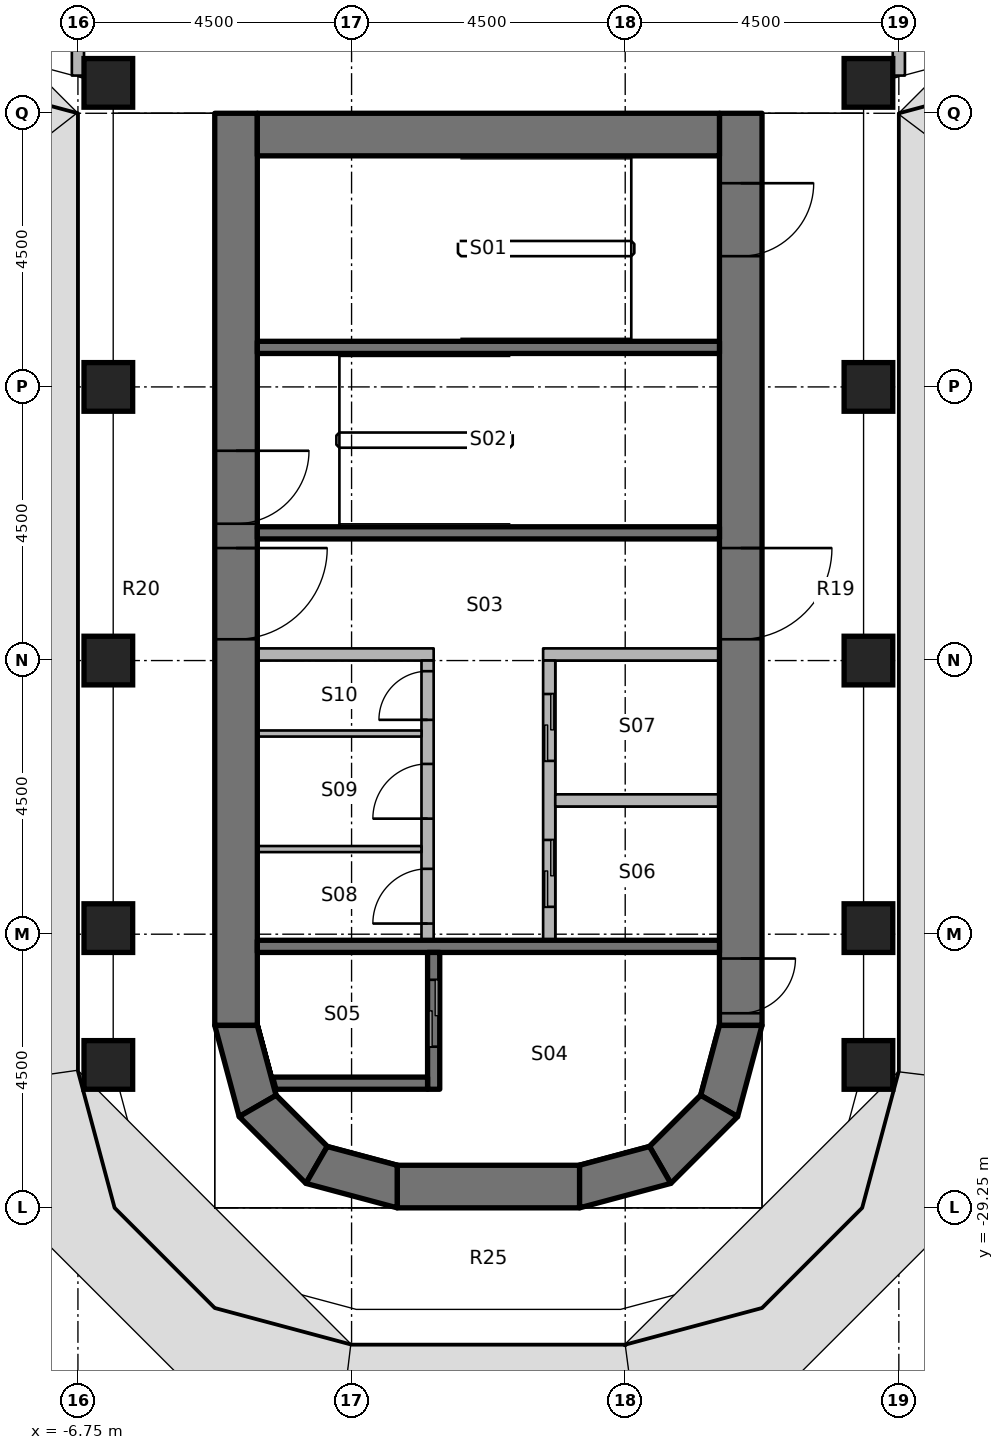
"""IFC4 building model, lengths in metres.
Left out: names, types, materials, properties, quantities, classifications, styles, units other than length and angle.
Written with IfcOpenShell. Run it as: python <this file> out.ifc"""

import sys

from ifc_helpers import new_model, si_unit, direction, frame, frame_2d, origin, origin_2d, place, context, subcontext, project, spatial, polyline, rectangle, outline, extrude, element, fill, save


model = new_model("IFC4")
c1 = context("Model", 3, precision=1e-05, world=origin(), true_north=direction((0.0, 1.0)))
c2 = subcontext(c1, "Body", "Model", "MODEL_VIEW")
j1 = project(units=[si_unit("LENGTHUNIT", "METRE"), si_unit("PLANEANGLEUNIT", "RADIAN")], contexts=[c1])
p1 = place(None, origin())
s1 = spatial("IfcSite", under=j1, at=p1, CompositionType="ELEMENT")
p2 = place(p1, origin())
s2 = spatial("IfcBuilding", under=s1, at=p2, CompositionType="ELEMENT")
p3 = place(p2, frame((0.0, 0.0, 171.4)))
s3 = spatial("IfcBuildingStorey", under=s2, at=p3, CompositionType="ELEMENT", Elevation=171.4)
for number, where, z_axis, x_axis in (
    (1, (-6.25, -26.9, 0.0), (0.0, 0.0, 1.0), (1.0, 0.0, 0.0)),
    (2, (-6.25, -24.65, 0.0), (0.0, 0.0, 1.0), (1.0, 0.0, 0.0)),
    (3, (-6.25, -20.25, 0.0), (0.0, 0.0, 1.0), (1.0, 0.0, 0.0)),
    (4, (-6.25, -15.75, 0.0), (0.0, 0.0, 1.0), (1.0, 0.0, 0.0)),
    (5, (-6.25, -10.75, 0.0), (0.0, 0.0, 1.0), (1.0, 0.0, 0.0)),
    (6, (6.25, -26.9, 0.0), (0.0, 0.0, 1.0), (1.0, 0.0, 0.0)),
    (7, (6.25, -24.65, 0.0), (0.0, 0.0, 1.0), (1.0, 0.0, 0.0)),
    (8, (6.25, -20.25, 0.0), (0.0, 0.0, 1.0), (1.0, 0.0, 0.0)),
    (9, (6.25, -15.75, 0.0), (0.0, 0.0, 1.0), (1.0, 0.0, 0.0)),
    (10, (6.25, -10.75, 0.0), (0.0, 0.0, 1.0), (1.0, 0.0, 0.0)),
):
    element("IfcColumn", number, at=place(p3, frame(where, z_axis=z_axis, x_axis=x_axis)), inside=s3, PredefinedType="COLUMN", context=c2, shape_type="SweptSolid", body=[
        extrude(rectangle(XDim=0.8, YDim=0.8, at=origin_2d()), origin(), (0.0, 0.0, 1.0), 3.65),
    ])
p4 = place(p3, frame((-4.15, -11.25, 0.0), z_axis=(0.0, 0.0, 1.0), x_axis=(0.0, -1.0, 0.0)))
e11 = element("IfcWall", 11, at=p4, inside=s3, PredefinedType="SHEAR", context=c2, shape_type="SweptSolid", body=[
    extrude(rectangle(XDim=15.0, YDim=0.7, at=frame_2d((7.5, 0.0))), origin(), (0.0, 0.0, 1.0), 3.8),
])
p5 = place(p4, frame((7.15, 0.0, 0.0)))
e12 = element("IfcOpeningElement", 12, at=p5, cuts=e11, PredefinedType="OPENING", context=c2, shape_type="SweptSolid", body=[
    extrude(rectangle(XDim=1.5, YDim=2.3, at=frame_2d((0.75, 1.15))), frame((0.0, 0.36, 0.0), z_axis=(0.0, -1.0, 0.0), x_axis=(1.0, 0.0, 0.0)), (0.0, 0.0, 1.0), 0.72),
])
p6 = place(p4, frame((5.55, 0.0, 0.0)))
e13 = element("IfcOpeningElement", 13, at=p6, cuts=e11, PredefinedType="OPENING", context=c2, shape_type="SweptSolid", body=[
    extrude(rectangle(XDim=1.2, YDim=2.1, at=frame_2d((0.6, 1.05))), frame((0.0, 0.36, 0.0), z_axis=(0.0, -1.0, 0.0), x_axis=(1.0, 0.0, 0.0)), (0.0, 0.0, 1.0), 0.72),
])
p7 = place(p3, frame((4.15, -11.25, 0.0), z_axis=(0.0, 0.0, 1.0), x_axis=(0.0, -1.0, 0.0)))
e14 = element("IfcWall", 14, at=p7, inside=s3, PredefinedType="SHEAR", context=c2, shape_type="SweptSolid", body=[
    extrude(rectangle(XDim=15.0, YDim=0.7, at=frame_2d((7.5, 0.0))), origin(), (0.0, 0.0, 1.0), 3.8),
])
p8 = place(p7, frame((7.15, 0.0, 0.0)))
e15 = element("IfcOpeningElement", 15, at=p8, cuts=e14, PredefinedType="OPENING", context=c2, shape_type="SweptSolid", body=[
    extrude(rectangle(XDim=1.5, YDim=2.3, at=frame_2d((0.75, 1.15))), frame((0.0, 0.36, 0.0), z_axis=(0.0, -1.0, 0.0), x_axis=(1.0, 0.0, 0.0)), (0.0, 0.0, 1.0), 0.72),
])
p9 = place(p7, frame((13.9, 0.0, 0.0)))
e16 = element("IfcOpeningElement", 16, at=p9, cuts=e14, PredefinedType="OPENING", context=c2, shape_type="SweptSolid", body=[
    extrude(rectangle(XDim=0.9, YDim=2.1, at=frame_2d((0.45, 1.05))), frame((0.0, 0.36, 0.0), z_axis=(0.0, -1.0, 0.0), x_axis=(1.0, 0.0, 0.0)), (0.0, 0.0, 1.0), 0.72),
])
p10 = place(p7, frame((1.15, 0.0, 0.0)))
e17 = element("IfcOpeningElement", 17, at=p10, cuts=e14, PredefinedType="OPENING", context=c2, shape_type="SweptSolid", body=[
    extrude(rectangle(XDim=1.2, YDim=2.1, at=frame_2d((0.6, 1.05))), frame((0.0, 0.36, 0.0), z_axis=(0.0, -1.0, 0.0), x_axis=(1.0, 0.0, 0.0)), (0.0, 0.0, 1.0), 0.72),
])
p11 = place(p3, frame((-3.8, -11.6, 0.0), z_axis=(0.0, 0.0, 1.0), x_axis=(1.0, 0.0, 0.0)))
e18 = element("IfcWall", 18, at=p11, inside=s3, PredefinedType="SHEAR", context=c2, shape_type="SweptSolid", body=[
    extrude(rectangle(XDim=7.6, YDim=0.7, at=frame_2d((3.8, 0.0))), origin(), (0.0, 0.0, 1.0), 3.8),
])
p12 = place(p3, frame((-1.5, -28.9, 0.0), z_axis=(0.0, 0.0, 1.0), x_axis=(1.0, 0.0, 0.0)))
e19 = element("IfcWall", 19, at=p12, inside=s3, PredefinedType="SHEAR", context=c2, shape_type="SweptSolid", body=[
    extrude(rectangle(XDim=3.0, YDim=0.7, at=frame_2d((1.5, 0.0))), origin(), (0.0, 0.0, 1.0), 3.8),
])
p13 = place(p3, origin())
e20 = element("IfcWall", 20, at=p13, inside=s3, PredefinedType="SHEAR", context=c2, shape_type="SweptSolid", body=[
    extrude(outline(polyline([(-4.5, -26.25), (-4.098, -27.75), (-3.492, -27.4), (-3.8, -26.25), (-4.5, -26.25)])), origin(), (0.0, 0.0, 1.0), 3.8),
])
p14 = place(p3, origin())
e21 = element("IfcWall", 21, at=p14, inside=s3, PredefinedType="SHEAR", context=c2, shape_type="SweptSolid", body=[
    extrude(outline(polyline([(-4.098, -27.75), (-3.0, -28.848), (-2.65, -28.242), (-3.492, -27.4), (-4.098, -27.75)])), origin(), (0.0, 0.0, 1.0), 3.8),
])
p15 = place(p3, origin())
e22 = element("IfcWall", 22, at=p15, inside=s3, PredefinedType="SHEAR", context=c2, shape_type="SweptSolid", body=[
    extrude(outline(polyline([(-3.0, -28.848), (-1.5, -29.25), (-1.5, -28.55), (-2.65, -28.242), (-3.0, -28.848)])), origin(), (0.0, 0.0, 1.0), 3.8),
])
p16 = place(p3, origin())
e23 = element("IfcWall", 23, at=p16, inside=s3, PredefinedType="SHEAR", context=c2, shape_type="SweptSolid", body=[
    extrude(outline(polyline([(4.5, -26.25), (4.098, -27.75), (3.492, -27.4), (3.8, -26.25), (4.5, -26.25)])), origin(), (0.0, 0.0, 1.0), 3.8),
])
p17 = place(p3, origin())
e24 = element("IfcWall", 24, at=p17, inside=s3, PredefinedType="SHEAR", context=c2, shape_type="SweptSolid", body=[
    extrude(outline(polyline([(4.098, -27.75), (3.0, -28.848), (2.65, -28.242), (3.492, -27.4), (4.098, -27.75)])), origin(), (0.0, 0.0, 1.0), 3.8),
])
p18 = place(p3, origin())
e25 = element("IfcWall", 25, at=p18, inside=s3, PredefinedType="SHEAR", context=c2, shape_type="SweptSolid", body=[
    extrude(outline(polyline([(3.0, -28.848), (1.5, -29.25), (1.5, -28.55), (2.65, -28.242), (3.0, -28.848)])), origin(), (0.0, 0.0, 1.0), 3.8),
])
p19 = place(p3, frame((3.8, -24.95, 0.0), z_axis=(0.0, 0.0, 1.0), x_axis=(-1.0, 0.0, 0.0)))
e26 = element("IfcWall", 26, at=p19, inside=s3, PredefinedType="SHEAR", context=c2, shape_type="SweptSolid", body=[
    extrude(rectangle(XDim=7.6, YDim=0.2, at=frame_2d((3.8, 0.0))), origin(), (0.0, 0.0, 1.0), 3.65),
])
p20 = place(p3, frame((-0.9, -27.3, 0.0), z_axis=(0.0, 0.0, 1.0), x_axis=(0.0, 1.0, 0.0)))
e27 = element("IfcWall", 27, at=p20, inside=s3, PredefinedType="SHEAR", context=c2, shape_type="SweptSolid", body=[
    extrude(rectangle(XDim=2.25, YDim=0.2, at=frame_2d((1.125, 0.0))), origin(), (0.0, 0.0, 1.0), 3.65),
])
p21 = place(p20, frame((0.7, 0.0, 0.0)))
e28 = element("IfcOpeningElement", 28, at=p21, cuts=e27, PredefinedType="OPENING", context=c2, shape_type="SweptSolid", body=[
    extrude(rectangle(XDim=1.1, YDim=2.3, at=frame_2d((0.55, 1.15))), frame((0.0, 0.11, 0.0), z_axis=(0.0, -1.0, 0.0), x_axis=(1.0, 0.0, 0.0)), (0.0, 0.0, 1.0), 0.22),
])
p22 = place(p3, origin())
e29 = element("IfcWall", 29, at=p22, inside=s3, PredefinedType="SHEAR", context=c2, shape_type="SweptSolid", body=[
    extrude(outline(polyline([(-1.0, -27.1), (-3.548, -27.1), (-3.494, -27.3), (-1.0, -27.3), (-1.0, -27.1)])), origin(), (0.0, 0.0, 1.0), 3.65),
])
for number, where, z_axis, x_axis in (
    (30, (3.8, -18.15, 0.0), (0.0, 0.0, 1.0), (-1.0, 0.0, 0.0)),
    (31, (3.8, -15.1, 0.0), (0.0, 0.0, 1.0), (-1.0, 0.0, 0.0)),
):
    element("IfcWall", number, at=place(p3, frame(where, z_axis=z_axis, x_axis=x_axis)), inside=s3, PredefinedType="SHEAR", context=c2, shape_type="SweptSolid", body=[
        extrude(rectangle(XDim=7.6, YDim=0.2, at=frame_2d((3.8, 0.0))), origin(), (0.0, 0.0, 1.0), 3.65),
    ])
p23 = place(p3, frame((3.8, -20.15, 0.0), z_axis=(0.0, 0.0, 1.0), x_axis=(-1.0, 0.0, 0.0)))
e32 = element("IfcWall", 32, at=p23, inside=s3, PredefinedType="PARTITIONING", context=c2, shape_type="SweptSolid", body=[
    extrude(rectangle(XDim=2.9, YDim=0.2, at=frame_2d((1.45, 0.0))), origin(), (0.0, 0.0, 1.0), 3.65),
])
p24 = place(p3, frame((1.0, -24.85, 0.0), z_axis=(0.0, 0.0, 1.0), x_axis=(0.0, 1.0, 0.0)))
e33 = element("IfcWall", 33, at=p24, inside=s3, PredefinedType="PARTITIONING", context=c2, shape_type="SweptSolid", body=[
    extrude(rectangle(XDim=4.6, YDim=0.2, at=frame_2d((2.3, 0.0))), origin(), (0.0, 0.0, 1.0), 3.65),
])
p25 = place(p24, frame((0.55, 0.0, 0.0)))
e34 = element("IfcOpeningElement", 34, at=p25, cuts=e33, PredefinedType="OPENING", context=c2, shape_type="SweptSolid", body=[
    extrude(rectangle(XDim=1.1, YDim=2.3, at=frame_2d((0.55, 1.15))), frame((0.0, 0.11, 0.0), z_axis=(0.0, -1.0, 0.0), x_axis=(1.0, 0.0, 0.0)), (0.0, 0.0, 1.0), 0.22),
])
p26 = place(p24, frame((2.95, 0.0, 0.0)))
e35 = element("IfcOpeningElement", 35, at=p26, cuts=e33, PredefinedType="OPENING", context=c2, shape_type="SweptSolid", body=[
    extrude(rectangle(XDim=1.1, YDim=2.3, at=frame_2d((0.55, 1.15))), frame((0.0, 0.11, 0.0), z_axis=(0.0, -1.0, 0.0), x_axis=(1.0, 0.0, 0.0)), (0.0, 0.0, 1.0), 0.22),
])
p27 = place(p3, frame((-0.9, -20.15, 0.0), z_axis=(0.0, 0.0, 1.0), x_axis=(-1.0, 0.0, 0.0)))
e36 = element("IfcWall", 36, at=p27, inside=s3, PredefinedType="PARTITIONING", context=c2, shape_type="SweptSolid", body=[
    extrude(rectangle(XDim=2.9, YDim=0.2, at=frame_2d((1.45, 0.0))), origin(), (0.0, 0.0, 1.0), 3.65),
])
p28 = place(p3, frame((-1.0, -24.85, 0.0), z_axis=(0.0, 0.0, 1.0), x_axis=(0.0, 1.0, 0.0)))
e37 = element("IfcWall", 37, at=p28, inside=s3, PredefinedType="PARTITIONING", context=c2, shape_type="SweptSolid", body=[
    extrude(rectangle(XDim=4.6, YDim=0.2, at=frame_2d((2.3, 0.0))), origin(), (0.0, 0.0, 1.0), 3.65),
])
p29 = place(p28, frame((0.275, 0.0, 0.0)))
e38 = element("IfcOpeningElement", 38, at=p29, cuts=e37, PredefinedType="OPENING", context=c2, shape_type="SweptSolid", body=[
    extrude(rectangle(XDim=0.9, YDim=2.1, at=frame_2d((0.45, 1.05))), frame((0.0, 0.11, 0.0), z_axis=(0.0, -1.0, 0.0), x_axis=(1.0, 0.0, 0.0)), (0.0, 0.0, 1.0), 0.22),
])
p30 = place(p28, frame((2.0, 0.0, 0.0)))
e39 = element("IfcOpeningElement", 39, at=p30, cuts=e37, PredefinedType="OPENING", context=c2, shape_type="SweptSolid", body=[
    extrude(rectangle(XDim=0.9, YDim=2.1, at=frame_2d((0.45, 1.05))), frame((0.0, 0.11, 0.0), z_axis=(0.0, -1.0, 0.0), x_axis=(1.0, 0.0, 0.0)), (0.0, 0.0, 1.0), 0.22),
])
p31 = place(p28, frame((3.625, 0.0, 0.0)))
e40 = element("IfcOpeningElement", 40, at=p31, cuts=e37, PredefinedType="OPENING", context=c2, shape_type="SweptSolid", body=[
    extrude(rectangle(XDim=0.8, YDim=2.1, at=frame_2d((0.4, 1.05))), frame((0.0, 0.11, 0.0), z_axis=(0.0, -1.0, 0.0), x_axis=(1.0, 0.0, 0.0)), (0.0, 0.0, 1.0), 0.22),
])
p32 = place(p3, frame((3.8, -22.55, 0.0), z_axis=(0.0, 0.0, 1.0), x_axis=(-1.0, 0.0, 0.0)))
e41 = element("IfcWall", 41, at=p32, inside=s3, PredefinedType="PARTITIONING", context=c2, shape_type="SweptSolid", body=[
    extrude(rectangle(XDim=2.7, YDim=0.2, at=frame_2d((1.35, 0.0))), origin(), (0.0, 0.0, 1.0), 3.65),
])
for number, where, z_axis, x_axis in (
    (42, (-1.1, -23.35, 0.0), (0.0, 0.0, 1.0), (-1.0, 0.0, 0.0)),
    (43, (-1.1, -21.45, 0.0), (0.0, 0.0, 1.0), (-1.0, 0.0, 0.0)),
):
    element("IfcWall", number, at=place(p3, frame(where, z_axis=z_axis, x_axis=x_axis)), inside=s3, PredefinedType="PARTITIONING", context=c2, shape_type="SweptSolid", body=[
        extrude(rectangle(XDim=2.7, YDim=0.1, at=frame_2d((1.35, 0.0))), origin(), (0.0, 0.0, 1.0), 3.65),
    ])
p33 = place(p3, frame((6.75, -6.85, 0.0), z_axis=(0.0, 0.0, 1.0), x_axis=(0.0, -1.0, 0.0)))
e44 = element("IfcWall", 44, at=p33, inside=s3, PredefinedType="PARTITIONING", context=c2, shape_type="SweptSolid", body=[
    extrude(rectangle(XDim=3.78, YDim=0.2, at=frame_2d((1.89, 0.0))), origin(), (0.0, 0.0, 1.0), 2.75),
])
p34 = place(p33, frame((1.44, 0.0, 0.0)))
e45 = element("IfcOpeningElement", 45, at=p34, cuts=e44, PredefinedType="OPENING", context=c2, shape_type="SweptSolid", body=[
    extrude(rectangle(XDim=0.9, YDim=2.1, at=frame_2d((0.45, 1.05))), frame((0.0, 0.11, 0.0), z_axis=(0.0, -1.0, 0.0), x_axis=(1.0, 0.0, 0.0)), (0.0, 0.0, 1.0), 0.22),
])
p35 = place(p3, frame((-6.75, -10.63, 0.0), z_axis=(0.0, 0.0, 1.0), x_axis=(0.0, 1.0, 0.0)))
e46 = element("IfcWall", 46, at=p35, inside=s3, PredefinedType="PARTITIONING", context=c2, shape_type="SweptSolid", body=[
    extrude(rectangle(XDim=3.78, YDim=0.2, at=frame_2d((1.89, 0.0))), origin(), (0.0, 0.0, 1.0), 2.75),
])
p36 = place(p8, origin())
e47 = element("IfcDoor", 47, at=p36, inside=s3, OperationType="DOUBLE_DOOR_SINGLE_SWING", PredefinedType="DOOR", context=c2, shape_type="SweptSolid", body=[
    extrude(rectangle(XDim=1.5, YDim=2.3, at=frame_2d((0.75, 1.15))), frame((0.0, 0.025, 0.0), z_axis=(0.0, -1.0, 0.0), x_axis=(1.0, 0.0, 0.0)), (0.0, 0.0, 1.0), 0.05),
])
fill(e15, e47)
p37 = place(p5, origin())
e48 = element("IfcDoor", 48, at=p37, inside=s3, OperationType="DOUBLE_DOOR_SINGLE_SWING", PredefinedType="DOOR", context=c2, shape_type="SweptSolid", body=[
    extrude(rectangle(XDim=1.5, YDim=2.3, at=frame_2d((0.75, 1.15))), frame((0.0, 0.025, 0.0), z_axis=(0.0, -1.0, 0.0), x_axis=(1.0, 0.0, 0.0)), (0.0, 0.0, 1.0), 0.05),
])
fill(e12, e48)
p38 = place(p9, origin())
e49 = element("IfcDoor", 49, at=p38, inside=s3, OperationType="SINGLE_SWING_RIGHT", PredefinedType="DOOR", context=c2, shape_type="SweptSolid", body=[
    extrude(rectangle(XDim=0.9, YDim=2.1, at=frame_2d((0.45, 1.05))), frame((0.0, 0.025, 0.0), z_axis=(0.0, -1.0, 0.0), x_axis=(1.0, 0.0, 0.0)), (0.0, 0.0, 1.0), 0.05),
])
fill(e16, e49)
p39 = place(p6, origin())
e50 = element("IfcDoor", 50, at=p39, inside=s3, OperationType="SINGLE_SWING_RIGHT", PredefinedType="DOOR", context=c2, shape_type="SweptSolid", body=[
    extrude(rectangle(XDim=1.2, YDim=2.1, at=frame_2d((0.6, 1.05))), frame((0.0, 0.025, 0.0), z_axis=(0.0, -1.0, 0.0), x_axis=(1.0, 0.0, 0.0)), (0.0, 0.0, 1.0), 0.05),
])
fill(e13, e50)
p40 = place(p10, origin())
e51 = element("IfcDoor", 51, at=p40, inside=s3, OperationType="SINGLE_SWING_RIGHT", PredefinedType="DOOR", context=c2, shape_type="SweptSolid", body=[
    extrude(rectangle(XDim=1.2, YDim=2.1, at=frame_2d((0.6, 1.05))), frame((0.0, 0.025, 0.0), z_axis=(0.0, -1.0, 0.0), x_axis=(1.0, 0.0, 0.0)), (0.0, 0.0, 1.0), 0.05),
])
fill(e17, e51)
p41 = place(p21, origin())
e52 = element("IfcDoor", 52, at=p41, inside=s3, OperationType="DOUBLE_DOOR_SLIDING", PredefinedType="DOOR", context=c2, shape_type="SweptSolid", body=[
    extrude(rectangle(XDim=1.1, YDim=2.3, at=frame_2d((0.55, 1.15))), frame((0.0, 0.025, 0.0), z_axis=(0.0, -1.0, 0.0), x_axis=(1.0, 0.0, 0.0)), (0.0, 0.0, 1.0), 0.05),
])
fill(e28, e52)
p42 = place(p25, origin())
e53 = element("IfcDoor", 53, at=p42, inside=s3, OperationType="DOUBLE_DOOR_SLIDING", PredefinedType="DOOR", context=c2, shape_type="SweptSolid", body=[
    extrude(rectangle(XDim=1.1, YDim=2.3, at=frame_2d((0.55, 1.15))), frame((0.0, 0.025, 0.0), z_axis=(0.0, -1.0, 0.0), x_axis=(1.0, 0.0, 0.0)), (0.0, 0.0, 1.0), 0.05),
])
fill(e34, e53)
p43 = place(p26, origin())
e54 = element("IfcDoor", 54, at=p43, inside=s3, OperationType="DOUBLE_DOOR_SLIDING", PredefinedType="DOOR", context=c2, shape_type="SweptSolid", body=[
    extrude(rectangle(XDim=1.1, YDim=2.3, at=frame_2d((0.55, 1.15))), frame((0.0, 0.025, 0.0), z_axis=(0.0, -1.0, 0.0), x_axis=(1.0, 0.0, 0.0)), (0.0, 0.0, 1.0), 0.05),
])
fill(e35, e54)
p44 = place(p29, origin())
e55 = element("IfcDoor", 55, at=p44, inside=s3, OperationType="SINGLE_SWING_LEFT", PredefinedType="DOOR", context=c2, shape_type="SweptSolid", body=[
    extrude(rectangle(XDim=0.9, YDim=2.1, at=frame_2d((0.45, 1.05))), frame((0.0, 0.025, 0.0), z_axis=(0.0, -1.0, 0.0), x_axis=(1.0, 0.0, 0.0)), (0.0, 0.0, 1.0), 0.05),
])
fill(e38, e55)
p45 = place(p30, origin())
e56 = element("IfcDoor", 56, at=p45, inside=s3, OperationType="SINGLE_SWING_RIGHT", PredefinedType="DOOR", context=c2, shape_type="SweptSolid", body=[
    extrude(rectangle(XDim=0.9, YDim=2.1, at=frame_2d((0.45, 1.05))), frame((0.0, 0.025, 0.0), z_axis=(0.0, -1.0, 0.0), x_axis=(1.0, 0.0, 0.0)), (0.0, 0.0, 1.0), 0.05),
])
fill(e39, e56)
p46 = place(p31, origin())
e57 = element("IfcDoor", 57, at=p46, inside=s3, OperationType="SINGLE_SWING_LEFT", PredefinedType="DOOR", context=c2, shape_type="SweptSolid", body=[
    extrude(rectangle(XDim=0.8, YDim=2.1, at=frame_2d((0.4, 1.05))), frame((0.0, 0.025, 0.0), z_axis=(0.0, -1.0, 0.0), x_axis=(1.0, 0.0, 0.0)), (0.0, 0.0, 1.0), 0.05),
])
fill(e40, e57)
save(model, sys.argv[1])
